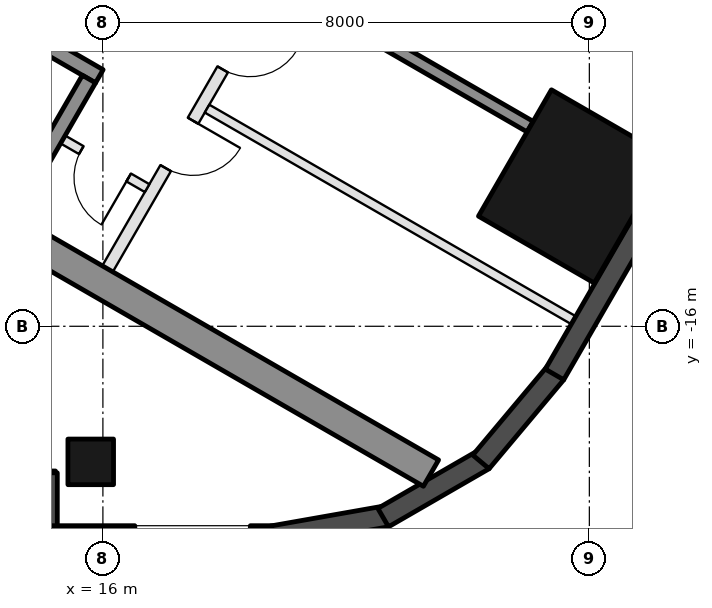
"""IFC4 building model, lengths in metres.
Left out: names, types, materials, properties, quantities, classifications, styles, units other than length and angle.
Written with IfcOpenShell. Run it as: python <this file> out.ifc"""

import sys

from ifc_helpers import new_model, si_unit, direction, frame, frame_2d, origin, origin_2d, place, context, subcontext, project, spatial, rectangle, hollow_rectangle, extrude, element, fill, save


model = new_model("IFC4")
c1 = context("Model", 3, precision=1e-05, world=origin(), true_north=direction((0.0, 1.0)))
c2 = subcontext(c1, "Body", "Model", "MODEL_VIEW")
j1 = project(units=[si_unit("LENGTHUNIT", "METRE"), si_unit("PLANEANGLEUNIT", "RADIAN")], contexts=[c1])
p1 = place(None, origin())
s1 = spatial("IfcSite", under=j1, at=p1, CompositionType="ELEMENT")
p2 = place(p1, origin())
s2 = spatial("IfcBuilding", under=s1, at=p2, CompositionType="ELEMENT")
p3 = place(p2, frame((0.0, 0.0, 209.5)))
s3 = spatial("IfcBuildingStorey", under=s2, at=p3, CompositionType="ELEMENT", Elevation=209.5)
p4 = place(p3, frame((15.8, -18.23, 0.0), z_axis=(0.0, 0.0, 1.0), x_axis=(-1.0, 0.0, 0.0)))
e1 = element("IfcColumn", 1, at=p4, inside=s3, PredefinedType="COLUMN", context=c2, shape_type="SweptSolid", body=[
    extrude(hollow_rectangle(XDim=0.75, YDim=0.75, WallThickness=0.035, at=origin_2d()), origin(), (0.0, 0.0, 1.0), 3.7),
])
p5 = place(p3, frame((23.729, -13.7, 0.0), z_axis=(0.0, 0.0, 1.0), x_axis=(0.5, 0.866025403784, 0.0)))
e2 = element("IfcColumn", 2, at=p5, inside=s3, PredefinedType="COLUMN", context=c2, shape_type="SweptSolid", body=[
    extrude(hollow_rectangle(XDim=2.4, YDim=2.2, WallThickness=0.06, at=origin_2d()), origin(), (0.0, 0.0, 1.0), 3.7),
])
p6 = place(p3, frame((8.48, -18.555, 0.0), z_axis=(0.0, 0.0, 1.0), x_axis=(1.0, 0.0, 0.0)))
e3 = element("IfcWall", 3, at=p6, inside=s3, PredefinedType="SOLIDWALL", context=c2, shape_type="SweptSolid", body=[
    extrude(rectangle(XDim=6.74, YDim=0.35, at=frame_2d((3.37, 0.0))), origin(), (0.0, 0.0, 1.0), 3.55),
])
p7 = place(p6, frame((0.32, 0.0, 0.0)))
e4 = element("IfcOpeningElement", 4, at=p7, cuts=e3, PredefinedType="OPENING", context=c2, shape_type="SweptSolid", body=[
    extrude(rectangle(XDim=2.4, YDim=2.4, at=frame_2d((1.2, 1.2))), frame((0.0, 0.185, 0.0), z_axis=(0.0, -1.0, 0.0), x_axis=(1.0, 0.0, 0.0)), (0.0, 0.0, 1.0), 0.37),
])
p8 = place(p6, frame((3.02, 0.0, 0.3)))
e5 = element("IfcOpeningElement", 5, at=p8, cuts=e3, PredefinedType="OPENING", context=c2, shape_type="SweptSolid", body=[
    extrude(rectangle(XDim=2.9, YDim=2.65, at=frame_2d((1.45, 1.325))), frame((0.0, 0.185, 0.0), z_axis=(0.0, -1.0, 0.0), x_axis=(1.0, 0.0, 0.0)), (0.0, 0.0, 1.0), 0.37),
])
p9 = place(p3, frame((15.075, -18.41, 0.0), z_axis=(0.0, 0.0, 1.0), x_axis=(0.0, -1.0, 0.0)))
e6 = element("IfcWall", 6, at=p9, inside=s3, PredefinedType="SOLIDWALL", context=c2, shape_type="SweptSolid", body=[
    extrude(rectangle(XDim=1.22, YDim=0.35, at=frame_2d((0.61, 0.0))), origin(), (0.0, 0.0, 1.0), 3.55),
])
p10 = place(p3, frame((14.9, -19.455, 0.0), z_axis=(0.0, 0.0, 1.0), x_axis=(1.0, 0.0, 0.0)))
e7 = element("IfcWall", 7, at=p10, inside=s3, PredefinedType="SOLIDWALL", context=c2, shape_type="SweptSolid", body=[
    extrude(rectangle(XDim=3.916, YDim=0.35, at=frame_2d((1.958, 0.0))), origin(), (0.0, 0.0, 1.0), 3.55),
])
p11 = place(p10, frame((1.625, 0.0, 0.3)))
e8 = element("IfcOpeningElement", 8, at=p11, cuts=e7, PredefinedType="OPENING", context=c2, shape_type="SweptSolid", body=[
    extrude(rectangle(XDim=1.9, YDim=2.65, at=frame_2d((0.95, 1.325))), frame((0.0, 0.185, 0.0), z_axis=(0.0, -1.0, 0.0), x_axis=(1.0, 0.0, 0.0)), (0.0, 0.0, 1.0), 0.37),
])
p12 = place(p3, frame((18.785, -19.458, 0.0), z_axis=(0.0, 0.0, 1.0), x_axis=(0.984798995425, 0.173697837091, 0.0)))
e9 = element("IfcWall", 9, at=p12, inside=s3, PredefinedType="SOLIDWALL", context=c2, shape_type="SweptSolid", body=[
    extrude(rectangle(XDim=1.91, YDim=0.35, at=frame_2d((0.955, 0.0))), origin(), (0.0, 0.0, 1.0), 3.55),
])
for number, where, z_axis, x_axis in (
    (10, (20.61, -19.147, 0.0), (0.0, 0.0, 1.0), (0.866, 0.5, 0.0)),
    (11, (22.217, -18.231, 0.0), (0.0, 0.0, 1.0), (0.643, 0.766, 0.0)),
):
    element("IfcWall", number, at=place(p3, frame(where, z_axis=z_axis, x_axis=x_axis)), inside=s3, PredefinedType="SOLIDWALL", context=c2, shape_type="SweptSolid", body=[
        extrude(rectangle(XDim=1.91, YDim=0.35, at=frame_2d((0.955, 0.0))), origin(), (0.0, 0.0, 1.0), 3.55),
    ])
p13 = place(p3, frame((23.427, -16.792, 0.0), z_axis=(0.0, 0.0, 1.0), x_axis=(0.500018773155, 0.866014564827, 0.0)))
e12 = element("IfcWall", 12, at=p13, inside=s3, PredefinedType="SOLIDWALL", context=c2, shape_type="SweptSolid", body=[
    extrude(rectangle(XDim=5.658, YDim=0.35, at=frame_2d((2.829, 0.0))), origin(), (0.0, 0.0, 1.0), 3.55),
])
p14 = place(p3, frame((8.547, -10.997, 0.0), z_axis=(0.0, 0.0, 1.0), x_axis=(0.866025009528, -0.500000682871, 0.0)))
e13 = element("IfcWall", 13, at=p14, inside=s3, PredefinedType="SHEAR", context=c2, shape_type="SweptSolid", body=[
    extrude(rectangle(XDim=14.837, YDim=0.5, at=frame_2d((7.418, 0.0))), origin(), (0.0, 0.0, 1.0), 3.5),
])
p15 = place(p3, frame((10.356, -8.664, 0.0), z_axis=(0.0, 0.0, 1.0), x_axis=(0.866028629588, -0.499994412703, 0.0)))
e14 = element("IfcWall", 14, at=p15, inside=s3, PredefinedType="SHEAR", context=c2, shape_type="SweptSolid", body=[
    extrude(rectangle(XDim=6.45, YDim=0.25, at=frame_2d((3.225, 0.0))), origin(), (0.0, 0.0, 1.0), 3.5),
])
p16 = place(p15, frame((0.3, 0.0, 0.0)))
e15 = element("IfcOpeningElement", 15, at=p16, cuts=e14, PredefinedType="OPENING", context=c2, shape_type="SweptSolid", body=[
    extrude(rectangle(XDim=1.0, YDim=2.1, at=frame_2d((0.5, 1.05))), frame((0.0, 0.135, 0.0), z_axis=(0.0, -1.0, 0.0), x_axis=(1.0, 0.0, 0.0)), (0.0, 0.0, 1.0), 0.27),
])
p17 = place(p3, frame((14.496, -14.143, 0.0), z_axis=(0.0, 0.0, 1.0), x_axis=(0.500062241894, 0.865989465428, 0.0)))
e16 = element("IfcWall", 16, at=p17, inside=s3, PredefinedType="SHEAR", context=c2, shape_type="SweptSolid", body=[
    extrude(rectangle(XDim=2.55, YDim=0.25, at=frame_2d((1.275, 0.0))), origin(), (0.0, 0.0, 1.0), 3.5),
])
p18 = place(p3, frame((20.567, -11.297, 0.0), z_axis=(0.0, 0.0, 1.0), x_axis=(0.866055327414, -0.49994816717, 0.0)))
e17 = element("IfcWall", 17, at=p18, inside=s3, PredefinedType="SHEAR", context=c2, shape_type="SweptSolid", body=[
    extrude(rectangle(XDim=2.84, YDim=0.2, at=frame_2d((1.42, 0.0))), origin(), (0.0, 0.0, 1.0), 3.5),
])
p19 = place(p3, frame((16.076, -15.055, 0.0), z_axis=(0.0, 0.0, 1.0), x_axis=(0.499995103361, 0.866028230842, 0.0)))
e18 = element("IfcWall", 18, at=p19, inside=s3, PredefinedType="PARTITIONING", context=c2, shape_type="SweptSolid", body=[
    extrude(rectangle(XDim=5.4, YDim=0.2, at=frame_2d((2.7, 0.0))), origin(), (0.0, 0.0, 1.0), 3.5),
])
p20 = place(p19, frame((1.913, 0.0, 0.0)))
e19 = element("IfcOpeningElement", 19, at=p20, cuts=e18, PredefinedType="OPENING", context=c2, shape_type="SweptSolid", body=[
    extrude(rectangle(XDim=0.9, YDim=2.1, at=frame_2d((0.45, 1.05))), frame((0.0, 0.11, 0.0), z_axis=(0.0, -1.0, 0.0), x_axis=(1.0, 0.0, 0.0)), (0.0, 0.0, 1.0), 0.22),
])
p21 = place(p19, frame((3.788, 0.0, 0.0)))
e20 = element("IfcOpeningElement", 20, at=p21, cuts=e18, PredefinedType="OPENING", context=c2, shape_type="SweptSolid", body=[
    extrude(rectangle(XDim=0.9, YDim=2.1, at=frame_2d((0.45, 1.05))), frame((0.0, 0.11, 0.0), z_axis=(0.0, -1.0, 0.0), x_axis=(1.0, 0.0, 0.0)), (0.0, 0.0, 1.0), 0.22),
])
p22 = place(p3, frame((15.342, -12.928, 0.0), z_axis=(0.0, 0.0, 1.0), x_axis=(0.865989903783, -0.500061482766, 0.0)))
e21 = element("IfcWall", 21, at=p22, inside=s3, PredefinedType="PARTITIONING", context=c2, shape_type="SweptSolid", body=[
    extrude(rectangle(XDim=1.6, YDim=0.15, at=frame_2d((0.8, 0.0))), origin(), (0.0, 0.0, 1.0), 3.5),
])
p23 = place(p22, frame((0.35, 0.0, 0.0)))
e22 = element("IfcOpeningElement", 22, at=p23, cuts=e21, PredefinedType="OPENING", context=c2, shape_type="SweptSolid", body=[
    extrude(rectangle(XDim=0.9, YDim=2.1, at=frame_2d((0.45, 1.05))), frame((0.0, 0.085, 0.0), z_axis=(0.0, -1.0, 0.0), x_axis=(1.0, 0.0, 0.0)), (0.0, 0.0, 1.0), 0.17),
])
p24 = place(p3, frame((17.713, -12.42, 0.0), z_axis=(0.0, 0.0, 1.0), x_axis=(0.866016523273, -0.500015381182, 0.0)))
e23 = element("IfcWall", 23, at=p24, inside=s3, PredefinedType="PARTITIONING", context=c2, shape_type="SweptSolid", body=[
    extrude(rectangle(XDim=6.95, YDim=0.15, at=frame_2d((3.475, 0.0))), origin(), (0.0, 0.0, 1.0), 3.5),
])
p25 = place(p23, frame((0.9, 0.0, 0.0), z_axis=(0.0, 0.0, 1.0), x_axis=(-1.0, 0.0, 0.0)))
e24 = element("IfcDoor", 24, at=p25, inside=s3, OperationType="SINGLE_SWING_LEFT", PredefinedType="DOOR", context=c2, shape_type="SweptSolid", body=[
    extrude(rectangle(XDim=0.9, YDim=2.1, at=frame_2d((0.45, 1.05))), frame((0.0, 0.025, 0.0), z_axis=(0.0, -1.0, 0.0), x_axis=(1.0, 0.0, 0.0)), (0.0, 0.0, 1.0), 0.05),
])
fill(e22, e24)
p26 = place(p20, frame((0.9, 0.0, 0.0), z_axis=(0.0, 0.0, 1.0), x_axis=(-1.0, 0.0, 0.0)))
e25 = element("IfcDoor", 25, at=p26, inside=s3, OperationType="SINGLE_SWING_LEFT", PredefinedType="DOOR", context=c2, shape_type="SweptSolid", body=[
    extrude(rectangle(XDim=0.9, YDim=2.1, at=frame_2d((0.45, 1.05))), frame((0.0, 0.025, 0.0), z_axis=(0.0, -1.0, 0.0), x_axis=(1.0, 0.0, 0.0)), (0.0, 0.0, 1.0), 0.05),
])
fill(e19, e25)
p27 = place(p21, frame((0.9, 0.0, 0.0), z_axis=(0.0, 0.0, 1.0), x_axis=(-1.0, 0.0, 0.0)))
e26 = element("IfcDoor", 26, at=p27, inside=s3, OperationType="SINGLE_SWING_LEFT", PredefinedType="DOOR", context=c2, shape_type="SweptSolid", body=[
    extrude(rectangle(XDim=0.9, YDim=2.1, at=frame_2d((0.45, 1.05))), frame((0.0, 0.025, 0.0), z_axis=(0.0, -1.0, 0.0), x_axis=(1.0, 0.0, 0.0)), (0.0, 0.0, 1.0), 0.05),
])
fill(e20, e26)
save(model, sys.argv[1])
